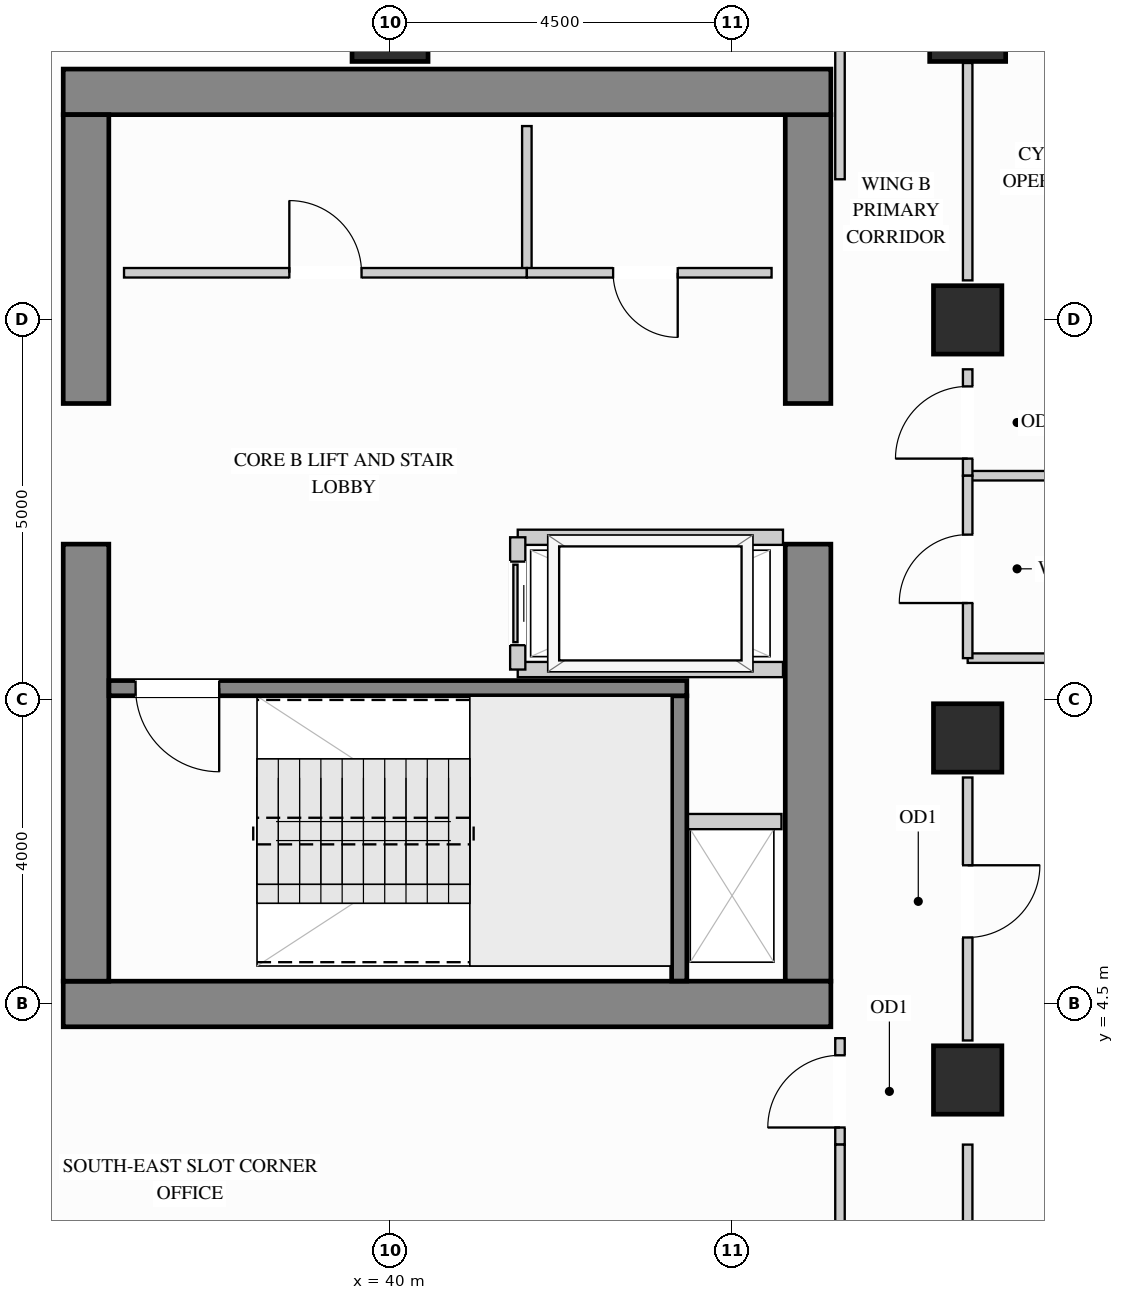
"""IFC4 building model, lengths in metres.
Left out: names, types, materials, properties, quantities, classifications, styles, units other than length and angle.
Written with IfcOpenShell. Run it as: python <this file> out.ifc"""

import sys

from ifc_helpers import new_model, si_unit, direction, frame, frame_2d, origin, origin_2d, place, context, subcontext, project, spatial, rectangle, extrude, source, transform, mapped, element, fill, save


model = new_model("IFC4")
c1 = context("Model", 3, precision=1e-05, world=origin(), true_north=direction((0.0, 1.0)))
c2 = subcontext(c1, "Body", "Model", "MODEL_VIEW")
j1 = project(units=[si_unit("LENGTHUNIT", "METRE"), si_unit("PLANEANGLEUNIT", "RADIAN")], contexts=[c1])
p1 = place(None, origin())
s1 = spatial("IfcSite", under=j1, at=p1, CompositionType="ELEMENT")
p2 = place(p1, origin())
s2 = spatial("IfcBuilding", under=s1, at=p2, CompositionType="ELEMENT")
p3 = place(p2, frame((0.0, 0.0, 143.1)))
s3 = spatial("IfcBuildingStorey", under=s2, at=p3, CompositionType="ELEMENT", Elevation=143.1)
m1 = source(origin(), c2, "Body", "SweptSolid", [
    extrude(rectangle(XDim=0.9, YDim=0.9, at=origin_2d()), origin(), (0.0, 0.0, 1.0), 3.4),
])
for number, where, z_axis, x_axis in (
    (1, (47.6, 13.5, 0.0), (0.0, 0.0, 1.0), (1.0, 0.0, 0.0)),
    (2, (47.6, 3.5, 0.0), (0.0, 0.0, 1.0), (1.0, 0.0, 0.0)),
    (3, (47.6, 8.0, 0.0), (0.0, 0.0, 1.0), (1.0, 0.0, 0.0)),
):
    element("IfcColumn", number, at=place(p3, frame(where, z_axis=z_axis, x_axis=x_axis)), inside=s3, PredefinedType="COLUMN", context=c2, shape_type="MappedRepresentation", body=[
        mapped(m1, transform((0.0, 0.0, 0.0), x_axis=(1.0, 0.0, 0.0), y_axis=(0.0, 1.0, 0.0), z_axis=(0.0, 0.0, 1.0))),
    ])
m2 = source(origin(), c2, "Body", "SweptSolid", [
    extrude(rectangle(XDim=1.0, YDim=1.0, at=origin_2d()), origin(), (0.0, 0.0, 1.0), 3.4),
])
for number, where, z_axis, x_axis in (
    (4, (40.0, 17.4, 0.0), (0.0, 0.0, 1.0), (1.0, 0.0, 0.0)),
    (5, (47.6, 17.4, 0.0), (0.0, 0.0, 1.0), (1.0, 0.0, 0.0)),
):
    element("IfcColumn", number, at=place(p3, frame(where, z_axis=z_axis, x_axis=x_axis)), inside=s3, PredefinedType="COLUMN", context=c2, shape_type="MappedRepresentation", body=[
        mapped(m2, transform((0.0, 0.0, 0.0), x_axis=(1.0, 0.0, 0.0), y_axis=(0.0, 1.0, 0.0), z_axis=(0.0, 0.0, 1.0))),
    ])
m3 = source(origin(), c2, "Body", "SweptSolid", [
    extrude(rectangle(XDim=5.75, YDim=0.6, at=frame_2d((2.875, 0.0))), origin(), (0.0, 0.0, 1.0), 3.4),
])
p4 = place(p3, frame((45.5, 4.8, 0.0), z_axis=(0.0, 0.0, 1.0), x_axis=(0.0, 1.0, 0.0)))
e6 = element("IfcWall", 6, at=p4, inside=s3, PredefinedType="SHEAR", context=c2, shape_type="MappedRepresentation", body=[
    mapped(m3, transform((0.0, 0.0, 0.0), x_axis=(1.0, 0.0, 0.0), y_axis=(0.0, 1.0, 0.0), z_axis=(0.0, 0.0, 1.0))),
])
m4 = source(origin(), c2, "Body", "SweptSolid", [
    extrude(rectangle(XDim=3.8, YDim=0.6, at=frame_2d((1.9, 0.0))), origin(), (0.0, 0.0, 1.0), 3.4),
])
p5 = place(p3, frame((45.5, 12.4, 0.0), z_axis=(0.0, 0.0, 1.0), x_axis=(0.0, 1.0, 0.0)))
e7 = element("IfcWall", 7, at=p5, inside=s3, PredefinedType="SHEAR", context=c2, shape_type="MappedRepresentation", body=[
    mapped(m4, transform((0.0, 0.0, 0.0), x_axis=(1.0, 0.0, 0.0), y_axis=(0.0, 1.0, 0.0), z_axis=(0.0, 0.0, 1.0))),
])
m5 = source(origin(), c2, "Body", "SweptSolid", [
    extrude(rectangle(XDim=10.1, YDim=0.6, at=frame_2d((5.05, 0.0))), origin(), (0.0, 0.0, 1.0), 3.4),
])
for number, where, z_axis, x_axis in (
    (8, (35.7, 16.5, 0.0), (0.0, 0.0, 1.0), (1.0, 0.0, 0.0)),
    (9, (35.7, 4.5, 0.0), (0.0, 0.0, 1.0), (1.0, 0.0, 0.0)),
):
    element("IfcWall", number, at=place(p3, frame(where, z_axis=z_axis, x_axis=x_axis)), inside=s3, PredefinedType="SHEAR", context=c2, shape_type="MappedRepresentation", body=[
        mapped(m5, transform((0.0, 0.0, 0.0), x_axis=(1.0, 0.0, 0.0), y_axis=(0.0, 1.0, 0.0), z_axis=(0.0, 0.0, 1.0))),
    ])
p6 = place(p3, frame((36.0, 4.8, 0.0), z_axis=(0.0, 0.0, 1.0), x_axis=(0.0, 1.0, 0.0)))
e10 = element("IfcWall", 10, at=p6, inside=s3, PredefinedType="SHEAR", context=c2, shape_type="MappedRepresentation", body=[
    mapped(m3, transform((0.0, 0.0, 0.0), x_axis=(1.0, 0.0, 0.0), y_axis=(0.0, 1.0, 0.0), z_axis=(0.0, 0.0, 1.0))),
])
p7 = place(p3, frame((36.0, 12.4, 0.0), z_axis=(0.0, 0.0, 1.0), x_axis=(0.0, 1.0, 0.0)))
e11 = element("IfcWall", 11, at=p7, inside=s3, PredefinedType="SHEAR", context=c2, shape_type="MappedRepresentation", body=[
    mapped(m4, transform((0.0, 0.0, 0.0), x_axis=(1.0, 0.0, 0.0), y_axis=(0.0, 1.0, 0.0), z_axis=(0.0, 0.0, 1.0))),
])
m6 = source(origin(), c2, "Body", "SweptSolid", [
    extrude(rectangle(XDim=1.93, YDim=0.125, at=frame_2d((0.965, 0.0))), origin(), (0.0, 0.0, 1.0), 3.385),
])
p8 = place(p3, frame((41.8, 14.12, 0.0), z_axis=(0.0, 0.0, 1.0), x_axis=(0.0, 1.0, 0.0)))
e12 = element("IfcWall", 12, at=p8, inside=s3, PredefinedType="PARTITIONING", context=c2, shape_type="MappedRepresentation", body=[
    mapped(m6, transform((0.0, 0.0, 0.0), x_axis=(1.0, 0.0, 0.0), y_axis=(0.0, 1.0, 0.0), z_axis=(0.0, 0.0, 1.0))),
])
p9 = place(p3, frame((36.5, 14.12, 0.0), z_axis=(0.0, 0.0, 1.0), x_axis=(1.0, 0.0, 0.0)))
e13 = element("IfcWall", 13, at=p9, inside=s3, PredefinedType="PARTITIONING", context=c2, shape_type="SweptSolid", body=[
    extrude(rectangle(XDim=5.3, YDim=0.125, at=frame_2d((2.65, 0.0))), origin(), (0.0, 0.0, 1.0), 3.385),
])
p10 = place(p9, frame((2.175, 0.0, 0.0)))
e14 = element("IfcOpeningElement", 14, at=p10, cuts=e13, PredefinedType="OPENING", context=c2, shape_type="SweptSolid", body=[
    extrude(rectangle(XDim=0.95, YDim=2.15, at=frame_2d((0.475, 1.075))), frame((0.0, 0.073, 0.0), z_axis=(0.0, -1.0, 0.0), x_axis=(1.0, 0.0, 0.0)), (0.0, 0.0, 1.0), 0.145),
])
p11 = place(p3, frame((41.8, 14.12, 0.0), z_axis=(0.0, 0.0, 1.0), x_axis=(1.0, 0.0, 0.0)))
e15 = element("IfcWall", 15, at=p11, inside=s3, PredefinedType="PARTITIONING", context=c2, shape_type="SweptSolid", body=[
    extrude(rectangle(XDim=3.22, YDim=0.125, at=frame_2d((1.61, 0.0))), origin(), (0.0, 0.0, 1.0), 3.385),
])
p12 = place(p11, frame((1.135, 0.0, 0.0)))
e16 = element("IfcOpeningElement", 16, at=p12, cuts=e15, PredefinedType="OPENING", context=c2, shape_type="SweptSolid", body=[
    extrude(rectangle(XDim=0.85, YDim=2.1, at=frame_2d((0.425, 1.05))), frame((0.0, 0.073, 0.0), z_axis=(0.0, -1.0, 0.0), x_axis=(1.0, 0.0, 0.0)), (0.0, 0.0, 1.0), 0.145),
])
m7 = source(origin(), c2, "Body", "SweptSolid", [
    extrude(rectangle(XDim=5.048, YDim=0.125, at=frame_2d((2.524, 0.0))), origin(), (0.0, 0.0, 1.0), 3.385),
])
for number, where, z_axis, x_axis in (
    (17, (47.6, 11.45, 0.0), (0.0, 0.0, 1.0), (1.0, 0.0, 0.0)),
    (18, (47.6, 9.05, 0.0), (0.0, 0.0, 1.0), (1.0, 0.0, 0.0)),
):
    element("IfcWall", number, at=place(p3, frame(where, z_axis=z_axis, x_axis=x_axis)), inside=s3, PredefinedType="PARTITIONING", context=c2, shape_type="MappedRepresentation", body=[
        mapped(m7, transform((0.0, 0.0, 0.0), x_axis=(1.0, 0.0, 0.0), y_axis=(0.0, 1.0, 0.0), z_axis=(0.0, 0.0, 1.0))),
    ])
p13 = place(p3, frame((47.6, 4.02, 0.0), z_axis=(0.0, 0.0, 1.0), x_axis=(0.0, 1.0, 0.0)))
e19 = element("IfcWall", 19, at=p13, inside=s3, PredefinedType="PARTITIONING", context=c2, shape_type="SweptSolid", body=[
    extrude(rectangle(XDim=3.46, YDim=0.125, at=frame_2d((1.73, 0.0))), origin(), (0.0, 0.0, 1.0), 2.773),
])
p14 = place(p13, frame((1.355, 0.0, 0.0)))
e20 = element("IfcOpeningElement", 20, at=p14, cuts=e19, PredefinedType="OPENING", context=c2, shape_type="SweptSolid", body=[
    extrude(rectangle(XDim=0.95, YDim=2.15, at=frame_2d((0.475, 1.075))), frame((0.0, 0.073, 0.0), z_axis=(0.0, -1.0, 0.0), x_axis=(1.0, 0.0, 0.0)), (0.0, 0.0, 1.0), 0.145),
])
m8 = source(origin(), c2, "Body", "SweptSolid", [
    extrude(rectangle(XDim=1.53, YDim=0.125, at=frame_2d((0.765, 0.0))), origin(), (0.0, 0.0, 1.0), 2.773),
])
p15 = place(p3, frame((47.6, 1.12, 0.0), z_axis=(0.0, 0.0, 1.0), x_axis=(0.0, 1.0, 0.0)))
e21 = element("IfcWall", 21, at=p15, inside=s3, PredefinedType="PARTITIONING", context=c2, shape_type="MappedRepresentation", body=[
    mapped(m8, transform((0.0, 0.0, 0.0), x_axis=(1.0, 0.0, 0.0), y_axis=(0.0, 1.0, 0.0), z_axis=(0.0, 0.0, 1.0))),
])
p16 = place(p3, frame((47.6, 11.45, 0.0), z_axis=(0.0, 0.0, 1.0), x_axis=(0.0, 1.0, 0.0)))
e22 = element("IfcWall", 22, at=p16, inside=s3, PredefinedType="PARTITIONING", context=c2, shape_type="SweptSolid", body=[
    extrude(rectangle(XDim=1.4, YDim=0.125, at=frame_2d((0.7, 0.0))), origin(), (0.0, 0.0, 1.0), 2.773),
])
p17 = place(p16, frame((0.225, 0.0, 0.0)))
e23 = element("IfcOpeningElement", 23, at=p17, cuts=e22, PredefinedType="OPENING", context=c2, shape_type="SweptSolid", body=[
    extrude(rectangle(XDim=0.95, YDim=2.15, at=frame_2d((0.475, 1.075))), frame((0.0, 0.073, 0.0), z_axis=(0.0, -1.0, 0.0), x_axis=(1.0, 0.0, 0.0)), (0.0, 0.0, 1.0), 0.145),
])
m9 = source(origin(), c2, "Body", "SweptSolid", [
    extrude(rectangle(XDim=2.86, YDim=0.125, at=frame_2d((1.43, 0.0))), origin(), (0.0, 0.0, 1.0), 2.773),
])
p18 = place(p3, frame((47.6, 14.02, 0.0), z_axis=(0.0, 0.0, 1.0), x_axis=(0.0, 1.0, 0.0)))
e24 = element("IfcWall", 24, at=p18, inside=s3, PredefinedType="PARTITIONING", context=c2, shape_type="MappedRepresentation", body=[
    mapped(m9, transform((0.0, 0.0, 0.0), x_axis=(1.0, 0.0, 0.0), y_axis=(0.0, 1.0, 0.0), z_axis=(0.0, 0.0, 1.0))),
])
p19 = place(p3, frame((47.6, 9.05, 0.0), z_axis=(0.0, 0.0, 1.0), x_axis=(0.0, 1.0, 0.0)))
e25 = element("IfcWall", 25, at=p19, inside=s3, PredefinedType="PARTITIONING", context=c2, shape_type="SweptSolid", body=[
    extrude(rectangle(XDim=2.4, YDim=0.125, at=frame_2d((1.2, 0.0))), origin(), (0.0, 0.0, 1.0), 2.773),
])
p20 = place(p19, frame((0.725, 0.0, 0.0)))
e26 = element("IfcOpeningElement", 26, at=p20, cuts=e25, PredefinedType="OPENING", context=c2, shape_type="SweptSolid", body=[
    extrude(rectangle(XDim=0.9, YDim=2.15, at=frame_2d((0.45, 1.075))), frame((0.0, 0.073, 0.0), z_axis=(0.0, -1.0, 0.0), x_axis=(1.0, 0.0, 0.0)), (0.0, 0.0, 1.0), 0.145),
])
m10 = source(origin(), c2, "Body", "SweptSolid", [
    extrude(rectangle(XDim=2.298, YDim=0.125, at=frame_2d((1.149, 0.0))), origin(), (0.0, 0.0, 1.0), 3.385),
])
p21 = place(p3, frame((45.92, 15.35, 0.0), z_axis=(0.0, 0.0, 1.0), x_axis=(0.0, 1.0, 0.0)))
e27 = element("IfcWall", 27, at=p21, inside=s3, PredefinedType="PARTITIONING", context=c2, shape_type="MappedRepresentation", body=[
    mapped(m10, transform((0.0, 0.0, 0.0), x_axis=(1.0, 0.0, 0.0), y_axis=(0.0, 1.0, 0.0), z_axis=(0.0, 0.0, 1.0))),
])
p22 = place(p3, frame((45.92, 2.65, 0.0), z_axis=(0.0, 0.0, 1.0), x_axis=(0.0, 1.0, 0.0)))
e28 = element("IfcWall", 28, at=p22, inside=s3, PredefinedType="PARTITIONING", context=c2, shape_type="SweptSolid", body=[
    extrude(rectangle(XDim=1.4, YDim=0.125, at=frame_2d((0.7, 0.0))), origin(), (0.0, 0.0, 1.0), 3.385),
])
p23 = place(p22, frame((0.225, 0.0, 0.0)))
e29 = element("IfcOpeningElement", 29, at=p23, cuts=e28, PredefinedType="OPENING", context=c2, shape_type="SweptSolid", body=[
    extrude(rectangle(XDim=0.95, YDim=2.15, at=frame_2d((0.475, 1.075))), frame((0.0, 0.073, 0.0), z_axis=(0.0, -1.0, 0.0), x_axis=(1.0, 0.0, 0.0)), (0.0, 0.0, 1.0), 0.145),
])
p24 = place(p3, frame((45.92, 0.352, 0.0), z_axis=(0.0, 0.0, 1.0), x_axis=(0.0, 1.0, 0.0)))
e30 = element("IfcWall", 30, at=p24, inside=s3, PredefinedType="PARTITIONING", context=c2, shape_type="MappedRepresentation", body=[
    mapped(m10, transform((0.0, 0.0, 0.0), x_axis=(1.0, 0.0, 0.0), y_axis=(0.0, 1.0, 0.0), z_axis=(0.0, 0.0, 1.0))),
])
m11 = source(origin(), c2, "Body", "SweptSolid", [
    extrude(rectangle(XDim=1.3, YDim=0.2, at=frame_2d((0.65, 0.0))), origin(), (0.0, 0.0, 1.0), 3.385),
])
p25 = place(p3, frame((43.85, 6.9, 0.0), z_axis=(0.0, 0.0, 1.0), x_axis=(1.0, 0.0, 0.0)))
e31 = element("IfcWall", 31, at=p25, inside=s3, PredefinedType="PARTITIONING", context=c2, shape_type="MappedRepresentation", body=[
    mapped(m11, transform((0.0, 0.0, 0.0), x_axis=(1.0, 0.0, 0.0), y_axis=(0.0, 1.0, 0.0), z_axis=(0.0, 0.0, 1.0))),
])
m12 = source(origin(), c2, "Body", "SweptSolid", [
    extrude(rectangle(XDim=3.49, YDim=0.2, at=frame_2d((1.745, 0.0))), origin(), (0.0, 0.0, 1.0), 3.385),
])
for number, where, z_axis, x_axis in (
    (32, (41.68, 10.64, 0.0), (0.0, 0.0, 1.0), (1.0, 0.0, 0.0)),
    (33, (41.68, 8.9, 0.0), (0.0, 0.0, 1.0), (1.0, 0.0, 0.0)),
):
    element("IfcWall", number, at=place(p3, frame(where, z_axis=z_axis, x_axis=x_axis)), inside=s3, PredefinedType="PARTITIONING", context=c2, shape_type="MappedRepresentation", body=[
        mapped(m12, transform((0.0, 0.0, 0.0), x_axis=(1.0, 0.0, 0.0), y_axis=(0.0, 1.0, 0.0), z_axis=(0.0, 0.0, 1.0))),
    ])
p26 = place(p3, frame((41.68, 8.9, 0.0), z_axis=(0.0, 0.0, 1.0), x_axis=(0.0, 1.0, 0.0)))
e34 = element("IfcWall", 34, at=p26, inside=s3, PredefinedType="PARTITIONING", context=c2, shape_type="SweptSolid", body=[
    extrude(rectangle(XDim=1.74, YDim=0.2, at=frame_2d((0.87, 0.0))), origin(), (0.0, 0.0, 1.0), 3.385),
])
p27 = place(p26, frame((0.32, 0.0, 0.0)))
e35 = element("IfcOpeningElement", 35, at=p27, cuts=e34, PredefinedType="OPENING", context=c2, shape_type="SweptSolid", body=[
    extrude(rectangle(XDim=1.1, YDim=2.2, at=frame_2d((0.55, 1.1))), frame((0.0, 0.11, 0.0), z_axis=(0.0, -1.0, 0.0), x_axis=(1.0, 0.0, 0.0)), (0.0, 0.0, 1.0), 0.22),
])
m13 = source(origin(), c2, "Body", "SweptSolid", [
    extrude(rectangle(XDim=3.753, YDim=0.2, at=frame_2d((1.876, 0.0))), origin(), (0.0, 0.0, 1.0), 3.4),
])
p28 = place(p3, frame((43.805, 4.802, 0.0), z_axis=(0.0, 0.0, 1.0), x_axis=(0.0, 1.0, 0.0)))
e36 = element("IfcWall", 36, at=p28, inside=s3, PredefinedType="SHEAR", context=c2, shape_type="MappedRepresentation", body=[
    mapped(m13, transform((0.0, 0.0, 0.0), x_axis=(1.0, 0.0, 0.0), y_axis=(0.0, 1.0, 0.0), z_axis=(0.0, 0.0, 1.0))),
])
p29 = place(p3, frame((36.302, 8.655, 0.0), z_axis=(0.0, 0.0, 1.0), x_axis=(1.0, 0.0, 0.0)))
e37 = element("IfcWall", 37, at=p29, inside=s3, PredefinedType="SHEAR", context=c2, shape_type="SweptSolid", body=[
    extrude(rectangle(XDim=7.603, YDim=0.2, at=frame_2d((3.802, 0.0))), origin(), (0.0, 0.0, 1.0), 3.4),
])
p30 = place(p29, frame((0.35, 0.0, 0.0)))
e38 = element("IfcOpeningElement", 38, at=p30, cuts=e37, PredefinedType="OPENING", context=c2, shape_type="SweptSolid", body=[
    extrude(rectangle(XDim=1.1, YDim=2.15, at=frame_2d((0.55, 1.075))), frame((0.0, 0.11, 0.0), z_axis=(0.0, -1.0, 0.0), x_axis=(1.0, 0.0, 0.0)), (0.0, 0.0, 1.0), 0.22),
])
m14 = source(origin(), c2, "Body", "SweptSolid", [
    extrude(rectangle(XDim=1.1, YDim=2.2, at=frame_2d((0.55, 1.1))), frame((0.0, 0.025, 0.0), z_axis=(0.0, -1.0, 0.0), x_axis=(1.0, 0.0, 0.0)), (0.0, 0.0, 1.0), 0.05),
])
p31 = place(p27, origin())
e39 = element("IfcDoor", 39, at=p31, inside=s3, OperationType="SLIDING_TO_LEFT", PredefinedType="DOOR", context=c2, shape_type="MappedRepresentation", body=[
    mapped(m14, transform((0.0, 0.0, 0.0), x_axis=(1.0, 0.0, 0.0), y_axis=(0.0, 1.0, 0.0), z_axis=(0.0, 0.0, 1.0))),
])
fill(e35, e39)
m15 = source(origin(), c2, "Body", "SweptSolid", [
    extrude(rectangle(XDim=0.95, YDim=2.15, at=frame_2d((0.475, 1.075))), frame((0.0, 0.025, 0.0), z_axis=(0.0, -1.0, 0.0), x_axis=(1.0, 0.0, 0.0)), (0.0, 0.0, 1.0), 0.05),
])
p32 = place(p10, origin())
e40 = element("IfcDoor", 40, at=p32, inside=s3, OperationType="SINGLE_SWING_LEFT", PredefinedType="DOOR", context=c2, shape_type="MappedRepresentation", body=[
    mapped(m15, transform((0.0, 0.0, 0.0), x_axis=(1.0, 0.0, 0.0), y_axis=(0.0, 1.0, 0.0), z_axis=(0.0, 0.0, 1.0))),
])
fill(e14, e40)
p33 = place(p23, origin())
e41 = element("IfcDoor", 41, at=p33, inside=s3, OperationType="SINGLE_SWING_LEFT", PredefinedType="DOOR", context=c2, shape_type="MappedRepresentation", body=[
    mapped(m15, transform((0.0, 0.0, 0.0), x_axis=(1.0, 0.0, 0.0), y_axis=(0.0, 1.0, 0.0), z_axis=(0.0, 0.0, 1.0))),
])
fill(e29, e41)
p34 = place(p14, origin())
e42 = element("IfcDoor", 42, at=p34, inside=s3, OperationType="SINGLE_SWING_RIGHT", PredefinedType="DOOR", context=c2, shape_type="MappedRepresentation", body=[
    mapped(m15, transform((0.0, 0.0, 0.0), x_axis=(1.0, 0.0, 0.0), y_axis=(0.0, 1.0, 0.0), z_axis=(0.0, 0.0, 1.0))),
])
fill(e20, e42)
p35 = place(p17, origin())
e43 = element("IfcDoor", 43, at=p35, inside=s3, OperationType="SINGLE_SWING_LEFT", PredefinedType="DOOR", context=c2, shape_type="MappedRepresentation", body=[
    mapped(m15, transform((0.0, 0.0, 0.0), x_axis=(1.0, 0.0, 0.0), y_axis=(0.0, 1.0, 0.0), z_axis=(0.0, 0.0, 1.0))),
])
fill(e23, e43)
m16 = source(origin(), c2, "Body", "SweptSolid", [
    extrude(rectangle(XDim=0.85, YDim=2.1, at=frame_2d((0.425, 1.05))), frame((0.0, 0.025, 0.0), z_axis=(0.0, -1.0, 0.0), x_axis=(1.0, 0.0, 0.0)), (0.0, 0.0, 1.0), 0.05),
])
p36 = place(p12, origin())
e44 = element("IfcDoor", 44, at=p36, inside=s3, OperationType="SINGLE_SWING_RIGHT", PredefinedType="DOOR", context=c2, shape_type="MappedRepresentation", body=[
    mapped(m16, transform((0.0, 0.0, 0.0), x_axis=(1.0, 0.0, 0.0), y_axis=(0.0, 1.0, 0.0), z_axis=(0.0, 0.0, 1.0))),
])
fill(e16, e44)
m17 = source(origin(), c2, "Body", "SweptSolid", [
    extrude(rectangle(XDim=1.1, YDim=2.15, at=frame_2d((0.55, 1.075))), frame((0.0, 0.025, 0.0), z_axis=(0.0, -1.0, 0.0), x_axis=(1.0, 0.0, 0.0)), (0.0, 0.0, 1.0), 0.05),
])
p37 = place(p30, origin())
e45 = element("IfcDoor", 45, at=p37, inside=s3, OperationType="SINGLE_SWING_RIGHT", PredefinedType="DOOR", context=c2, shape_type="MappedRepresentation", body=[
    mapped(m17, transform((0.0, 0.0, 0.0), x_axis=(1.0, 0.0, 0.0), y_axis=(0.0, 1.0, 0.0), z_axis=(0.0, 0.0, 1.0))),
])
fill(e38, e45)
m18 = source(origin(), c2, "Body", "SweptSolid", [
    extrude(rectangle(XDim=0.9, YDim=2.15, at=frame_2d((0.45, 1.075))), frame((0.0, 0.025, 0.0), z_axis=(0.0, -1.0, 0.0), x_axis=(1.0, 0.0, 0.0)), (0.0, 0.0, 1.0), 0.05),
])
p38 = place(p20, origin())
e46 = element("IfcDoor", 46, at=p38, inside=s3, OperationType="SINGLE_SWING_LEFT", PredefinedType="DOOR", context=c2, shape_type="MappedRepresentation", body=[
    mapped(m18, transform((0.0, 0.0, 0.0), x_axis=(1.0, 0.0, 0.0), y_axis=(0.0, 1.0, 0.0), z_axis=(0.0, 0.0, 1.0))),
])
fill(e26, e46)
save(model, sys.argv[1])
